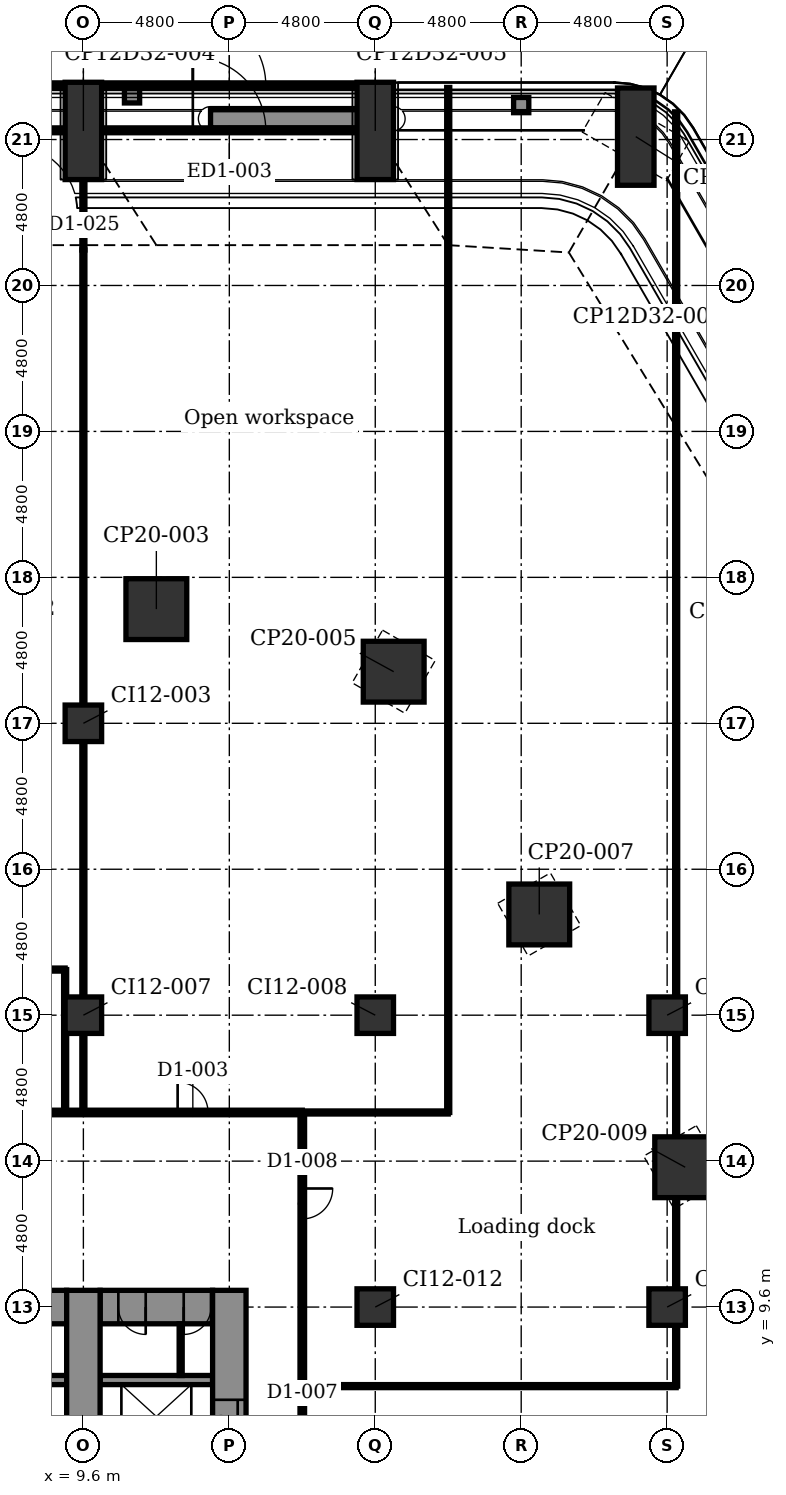
"""IFC4 building model, lengths in metres.
Left out: names, types, materials, properties, quantities, classifications, styles, units other than length and angle.
Written with IfcOpenShell. Run it as: python <this file> out.ifc"""

import sys

from ifc_helpers import new_model, si_unit, direction, frame, frame_2d, origin, origin_2d, place, context, subcontext, project, spatial, rectangle, extrude, element, fill, save


model = new_model("IFC4")
c1 = context("Model", 3, precision=1e-05, world=origin(), true_north=direction((0.0, 1.0)))
c2 = subcontext(c1, "Body", "Model", "MODEL_VIEW")
j1 = project(units=[si_unit("LENGTHUNIT", "METRE"), si_unit("PLANEANGLEUNIT", "RADIAN")], contexts=[c1])
p1 = place(None, origin())
s1 = spatial("IfcSite", under=j1, at=p1, CompositionType="ELEMENT")
p2 = place(p1, origin())
s2 = spatial("IfcBuilding", under=s1, at=p2, CompositionType="ELEMENT")
p3 = place(p2, origin())
s3 = spatial("IfcBuildingStorey", under=s2, at=p3, CompositionType="ELEMENT", Elevation=0.0)
for number, where, z_axis, x_axis in (
    (1, (9.6, 48.283, -0.4), (0.0, 0.0, 1.0), (1.0, 0.0, 0.0)),
    (2, (19.2, 48.283, -0.4), (0.0, 0.0, 1.0), (1.0, 0.0, 0.0)),
    (3, (27.768, 48.095, -0.4), (0.0, 0.0, 1.0), (0.5, 0.866, 0.0)),
):
    element("IfcColumn", number, at=place(p3, frame(where, z_axis=z_axis, x_axis=x_axis)), inside=s3, PredefinedType="COLUMN", context=c2, shape_type="SweptSolid", body=[
        extrude(rectangle(XDim=1.2, YDim=3.2, at=origin_2d()), origin(), (0.0, 0.0, 1.0), 7.1),
    ])
for number, where, z_axis, x_axis in (
    (4, (12.0, 32.555, -0.4), (0.0, 0.0, 1.0), (1.0, 0.0, 0.0)),
    (5, (19.806, 30.498, -0.4), (0.0, 0.0, 1.0), (0.5, 0.866, 0.0)),
    (6, (24.594, 22.513, -0.4), (0.0, 0.0, 1.0), (0.866, 0.5, 0.0)),
    (7, (29.394, 14.199, -0.4), (0.0, 0.0, 1.0), (0.866, 0.5, 0.0)),
):
    element("IfcColumn", number, at=place(p3, frame(where, z_axis=z_axis, x_axis=x_axis)), inside=s3, PredefinedType="COLUMN", context=c2, shape_type="SweptSolid", body=[
        extrude(rectangle(XDim=2.0, YDim=2.0, at=origin_2d()), origin(), (0.0, 0.0, 1.0), 7.1),
    ])
for number, where, z_axis, x_axis in (
    (8, (9.6, 19.2, -0.4), (0.0, 0.0, 1.0), (1.0, 0.0, 0.0)),
    (9, (9.6, 28.8, -0.4), (0.0, 0.0, 1.0), (1.0, 0.0, 0.0)),
    (10, (19.2, 9.6, -0.4), (0.0, 0.0, 1.0), (1.0, 0.0, 0.0)),
    (11, (19.2, 19.2, -0.4), (0.0, 0.0, 1.0), (1.0, 0.0, 0.0)),
    (12, (28.8, 9.6, -0.4), (0.0, 0.0, 1.0), (1.0, 0.0, 0.0)),
    (13, (28.8, 19.2, -0.4), (0.0, 0.0, 1.0), (1.0, 0.0, 0.0)),
):
    element("IfcColumn", number, at=place(p3, frame(where, z_axis=z_axis, x_axis=x_axis)), inside=s3, PredefinedType="COLUMN", context=c2, shape_type="SweptSolid", body=[
        extrude(rectangle(XDim=1.2, YDim=1.2, at=origin_2d()), origin(), (0.0, 0.0, 1.0), 7.1),
    ])
p4 = place(p3, frame((6.0, 7.2, -0.4), z_axis=(0.0, 0.0, 1.0), x_axis=(1.0, 0.0, 0.0)))
e14 = element("IfcWall", 14, at=p4, inside=s3, PredefinedType="STANDARD", context=c2, shape_type="SweptSolid", body=[
    extrude(rectangle(XDim=3.05, YDim=0.3, at=frame_2d((1.525, 0.0))), origin(), (0.0, 0.0, 1.0), 7.1),
])
p5 = place(p3, frame((10.15, 7.2, -0.4), z_axis=(0.0, 0.0, 1.0), x_axis=(1.0, 0.0, 0.0)))
e15 = element("IfcWall", 15, at=p5, inside=s3, PredefinedType="STANDARD", context=c2, shape_type="SweptSolid", body=[
    extrude(rectangle(XDim=3.7, YDim=0.3, at=frame_2d((1.85, 0.0))), origin(), (0.0, 0.0, 1.0), 7.1),
])
p6 = place(p3, frame((-5.25, 9.6, -0.4), z_axis=(0.0, 0.0, 1.0), x_axis=(1.0, 0.0, 0.0)))
e16 = element("IfcWall", 16, at=p6, inside=s3, PredefinedType="SHEAR", context=c2, shape_type="SweptSolid", body=[
    extrude(rectangle(XDim=14.3, YDim=1.1, at=frame_2d((7.15, 0.0))), origin(), (0.0, 0.0, 1.0), 7.1),
])
p7 = place(p6, frame((9.35, 0.0, 0.4)))
e17 = element("IfcOpeningElement", 17, at=p7, cuts=e16, PredefinedType="OPENING", context=c2, shape_type="SweptSolid", body=[
    extrude(rectangle(XDim=1.4, YDim=2.1, at=frame_2d((0.7, 1.05))), frame((0.0, 0.56, 0.0), z_axis=(0.0, -1.0, 0.0), x_axis=(1.0, 0.0, 0.0)), (0.0, 0.0, 1.0), 1.12),
])
p8 = place(p3, frame((10.15, 9.6, -0.4), z_axis=(0.0, 0.0, 1.0), x_axis=(1.0, 0.0, 0.0)))
e18 = element("IfcWall", 18, at=p8, inside=s3, PredefinedType="SHEAR", context=c2, shape_type="SweptSolid", body=[
    extrude(rectangle(XDim=3.7, YDim=1.1, at=frame_2d((1.85, 0.0))), origin(), (0.0, 0.0, 1.0), 7.1),
])
p9 = place(p8, frame((0.6, 0.0, 0.4)))
e19 = element("IfcOpeningElement", 19, at=p9, cuts=e18, PredefinedType="OPENING", context=c2, shape_type="SweptSolid", body=[
    extrude(rectangle(XDim=0.9, YDim=2.1, at=frame_2d((0.45, 1.05))), frame((0.0, 0.56, 0.0), z_axis=(0.0, -1.0, 0.0), x_axis=(1.0, 0.0, 0.0)), (0.0, 0.0, 1.0), 1.12),
])
p10 = place(p8, frame((2.75, 0.0, 0.4)))
e20 = element("IfcOpeningElement", 20, at=p10, cuts=e18, PredefinedType="OPENING", context=c2, shape_type="SweptSolid", body=[
    extrude(rectangle(XDim=0.9, YDim=2.1, at=frame_2d((0.45, 1.05))), frame((0.0, 0.56, 0.0), z_axis=(0.0, -1.0, 0.0), x_axis=(1.0, 0.0, 0.0)), (0.0, 0.0, 1.0), 1.12),
])
p11 = place(p3, frame((9.6, -10.15, -0.4), z_axis=(0.0, 0.0, 1.0), x_axis=(0.0, 1.0, 0.0)))
e21 = element("IfcWall", 21, at=p11, inside=s3, PredefinedType="SHEAR", context=c2, shape_type="SweptSolid", body=[
    extrude(rectangle(XDim=20.3, YDim=1.1, at=frame_2d((10.15, 0.0))), origin(), (0.0, 0.0, 1.0), 7.1),
])
p12 = place(p3, frame((14.4, -10.15, -0.4), z_axis=(0.0, 0.0, 1.0), x_axis=(0.0, 1.0, 0.0)))
e22 = element("IfcWall", 22, at=p12, inside=s3, PredefinedType="SHEAR", context=c2, shape_type="SweptSolid", body=[
    extrude(rectangle(XDim=20.3, YDim=1.1, at=frame_2d((10.15, 0.0))), origin(), (0.0, 0.0, 1.0), 7.1),
])
p13 = place(p12, frame((3.6, 0.0, 0.4)))
e23 = element("IfcOpeningElement", 23, at=p13, cuts=e22, PredefinedType="OPENING", context=c2, shape_type="SweptSolid", body=[
    extrude(rectangle(XDim=1.1, YDim=2.1, at=frame_2d((0.55, 1.05))), frame((0.0, 0.56, 0.0), z_axis=(0.0, -1.0, 0.0), x_axis=(1.0, 0.0, 0.0)), (0.0, 0.0, 1.0), 1.12),
])
p14 = place(p12, frame((6.0, 0.0, 0.4)))
e24 = element("IfcOpeningElement", 24, at=p14, cuts=e22, PredefinedType="OPENING", context=c2, shape_type="SweptSolid", body=[
    extrude(rectangle(XDim=1.1, YDim=2.1, at=frame_2d((0.55, 1.05))), frame((0.0, 0.56, 0.0), z_axis=(0.0, -1.0, 0.0), x_axis=(1.0, 0.0, 0.0)), (0.0, 0.0, 1.0), 1.12),
])
p15 = place(p12, frame((8.4, 0.0, 0.4)))
e25 = element("IfcOpeningElement", 25, at=p15, cuts=e22, PredefinedType="OPENING", context=c2, shape_type="SweptSolid", body=[
    extrude(rectangle(XDim=1.1, YDim=2.1, at=frame_2d((0.55, 1.05))), frame((0.0, 0.56, 0.0), z_axis=(0.0, -1.0, 0.0), x_axis=(1.0, 0.0, 0.0)), (0.0, 0.0, 1.0), 1.12),
])
p16 = place(p12, frame((10.8, 0.0, 0.4)))
e26 = element("IfcOpeningElement", 26, at=p16, cuts=e22, PredefinedType="OPENING", context=c2, shape_type="SweptSolid", body=[
    extrude(rectangle(XDim=1.1, YDim=2.1, at=frame_2d((0.55, 1.05))), frame((0.0, 0.56, 0.0), z_axis=(0.0, -1.0, 0.0), x_axis=(1.0, 0.0, 0.0)), (0.0, 0.0, 1.0), 1.12),
])
p17 = place(p12, frame((13.2, 0.0, 0.4)))
e27 = element("IfcOpeningElement", 27, at=p17, cuts=e22, PredefinedType="OPENING", context=c2, shape_type="SweptSolid", body=[
    extrude(rectangle(XDim=1.1, YDim=2.1, at=frame_2d((0.55, 1.05))), frame((0.0, 0.56, 0.0), z_axis=(0.0, -1.0, 0.0), x_axis=(1.0, 0.0, 0.0)), (0.0, 0.0, 1.0), 1.12),
])
p18 = place(p12, frame((15.6, 0.0, 0.4)))
e28 = element("IfcOpeningElement", 28, at=p18, cuts=e22, PredefinedType="OPENING", context=c2, shape_type="SweptSolid", body=[
    extrude(rectangle(XDim=1.1, YDim=2.1, at=frame_2d((0.55, 1.05))), frame((0.0, 0.56, 0.0), z_axis=(0.0, -1.0, 0.0), x_axis=(1.0, 0.0, 0.0)), (0.0, 0.0, 1.0), 1.12),
])
p19 = place(p3, frame((0.602, 48.303, 0.0), z_axis=(0.0, 0.0, 1.0), x_axis=(1.0, 0.0, 0.0)))
e29 = element("IfcWall", 29, at=p19, inside=s3, PredefinedType="PARTITIONING", context=c2, shape_type="SweptSolid", body=[
    extrude(rectangle(XDim=8.396, YDim=0.16, at=frame_2d((4.198, 0.0))), origin(), (0.0, 0.0, 1.0), 6.7),
])
p20 = place(p19, frame((2.998, 0.0, 0.0)))
e30 = element("IfcOpeningElement", 30, at=p20, cuts=e29, PredefinedType="OPENING", context=c2, shape_type="SweptSolid", body=[
    extrude(rectangle(XDim=2.4, YDim=2.4, at=frame_2d((1.2, 1.2))), frame((0.0, 0.09, 0.0), z_axis=(0.0, -1.0, 0.0), x_axis=(1.0, 0.0, 0.0)), (0.0, 0.0, 1.0), 0.18),
])
p21 = place(p3, frame((10.202, 48.303, 0.0), z_axis=(0.0, 0.0, 1.0), x_axis=(1.0, 0.0, 0.0)))
e31 = element("IfcWall", 31, at=p21, inside=s3, PredefinedType="PARTITIONING", context=c2, shape_type="SweptSolid", body=[
    extrude(rectangle(XDim=8.396, YDim=0.16, at=frame_2d((4.198, 0.0))), origin(), (0.0, 0.0, 1.0), 6.7),
])
p22 = place(p21, frame((2.998, 0.0, 0.0)))
e32 = element("IfcOpeningElement", 32, at=p22, cuts=e31, PredefinedType="OPENING", context=c2, shape_type="SweptSolid", body=[
    extrude(rectangle(XDim=2.4, YDim=2.4, at=frame_2d((1.2, 1.2))), frame((0.0, 0.09, 0.0), z_axis=(0.0, -1.0, 0.0), x_axis=(1.0, 0.0, 0.0)), (0.0, 0.0, 1.0), 0.18),
])
p23 = place(p3, frame((0.604, 49.783, 0.0), z_axis=(0.0, 0.0, 1.0), x_axis=(1.0, 0.0, 0.0)))
e33 = element("IfcWall", 33, at=p23, inside=s3, PredefinedType="PARTITIONING", context=c2, shape_type="SweptSolid", body=[
    extrude(rectangle(XDim=8.392, YDim=0.16, at=frame_2d((4.196, 0.0))), origin(), (0.0, 0.0, 1.0), 6.7),
])
p24 = place(p23, frame((2.996, 0.0, 0.0)))
e34 = element("IfcOpeningElement", 34, at=p24, cuts=e33, PredefinedType="OPENING", context=c2, shape_type="SweptSolid", body=[
    extrude(rectangle(XDim=2.4, YDim=2.4, at=frame_2d((1.2, 1.2))), frame((0.0, 0.09, 0.0), z_axis=(0.0, -1.0, 0.0), x_axis=(1.0, 0.0, 0.0)), (0.0, 0.0, 1.0), 0.18),
])
p25 = place(p3, frame((10.204, 49.783, 0.0), z_axis=(0.0, 0.0, 1.0), x_axis=(1.0, 0.0, 0.0)))
e35 = element("IfcWall", 35, at=p25, inside=s3, PredefinedType="PARTITIONING", context=c2, shape_type="SweptSolid", body=[
    extrude(rectangle(XDim=8.392, YDim=0.16, at=frame_2d((4.196, 0.0))), origin(), (0.0, 0.0, 1.0), 6.7),
])
p26 = place(p25, frame((2.996, 0.0, 0.0)))
e36 = element("IfcOpeningElement", 36, at=p26, cuts=e35, PredefinedType="OPENING", context=c2, shape_type="SweptSolid", body=[
    extrude(rectangle(XDim=2.4, YDim=2.4, at=frame_2d((1.2, 1.2))), frame((0.0, 0.09, 0.0), z_axis=(0.0, -1.0, 0.0), x_axis=(1.0, 0.0, 0.0)), (0.0, 0.0, 1.0), 0.18),
])
p27 = place(p3, frame((13.782, 48.683, 7.0), z_axis=(0.0, 0.0, 1.0), x_axis=(1.0, 0.0, 0.0)))
e37 = element("IfcWall", 37, at=p27, inside=s3, PredefinedType="USERDEFINED", context=c2, shape_type="SweptSolid", body=[
    extrude(rectangle(XDim=6.0, YDim=0.6, at=frame_2d((3.0, 0.0))), origin(), (0.0, 0.0, 1.0), 0.7),
])
for number, where, z_axis, x_axis in (
    (38, (10.95, 49.453, 0.0), (0.0, 0.0, 1.0), (1.0, 0.0, 0.0)),
    (39, (23.75, 49.133, 0.0), (0.0, 0.0, 1.0), (1.0, 0.0, 0.0)),
):
    element("IfcWall", number, at=place(p3, frame(where, z_axis=z_axis, x_axis=x_axis)), inside=s3, PredefinedType="SOLIDWALL", context=c2, shape_type="SweptSolid", body=[
        extrude(rectangle(XDim=0.5, YDim=0.5, at=frame_2d((0.25, 0.0))), origin(), (0.0, 0.0, 1.0), 6.4),
    ])
p28 = place(p3, frame((29.097, 7.0, 0.0), z_axis=(0.0, 0.0, 1.0), x_axis=(0.0, 1.0, 0.0)))
e40 = element("IfcWall", 40, at=p28, inside=s3, PredefinedType="PARTITIONING", context=c2, shape_type="SweptSolid", body=[
    extrude(rectangle(XDim=41.911, YDim=0.1, at=frame_2d((20.956, 0.0))), origin(), (0.0, 0.0, 1.0), 6.7),
])
p29 = place(p3, frame((21.6, 16.0, 0.0), z_axis=(0.0, 0.0, 1.0), x_axis=(0.0, 1.0, 0.0)))
e41 = element("IfcWall", 41, at=p29, inside=s3, PredefinedType="PARTITIONING", context=c2, shape_type="SweptSolid", body=[
    extrude(rectangle(XDim=33.713, YDim=0.1, at=frame_2d((16.856, 0.0))), origin(), (0.0, 0.0, 1.0), 6.7),
])
p30 = place(p3, frame((16.8, 3.95, 0.0), z_axis=(0.0, 0.0, 1.0), x_axis=(0.0, 1.0, 0.0)))
e42 = element("IfcWall", 42, at=p30, inside=s3, PredefinedType="PARTITIONING", context=c2, shape_type="SweptSolid", body=[
    extrude(rectangle(XDim=12.05, YDim=0.15, at=frame_2d((6.025, 0.0))), origin(), (0.0, 0.0, 1.0), 6.7),
])
p31 = place(p30, frame((0.95, 0.0, 0.0)))
e43 = element("IfcOpeningElement", 43, at=p31, cuts=e42, PredefinedType="OPENING", context=c2, shape_type="SweptSolid", body=[
    extrude(rectangle(XDim=1.0, YDim=2.1, at=frame_2d((0.5, 1.05))), frame((0.0, 0.085, 0.0), z_axis=(0.0, -1.0, 0.0), x_axis=(1.0, 0.0, 0.0)), (0.0, 0.0, 1.0), 0.17),
])
p32 = place(p30, frame((8.55, 0.0, 0.0)))
e44 = element("IfcOpeningElement", 44, at=p32, cuts=e42, PredefinedType="OPENING", context=c2, shape_type="SweptSolid", body=[
    extrude(rectangle(XDim=1.0, YDim=2.1, at=frame_2d((0.5, 1.05))), frame((0.0, 0.085, 0.0), z_axis=(0.0, -1.0, 0.0), x_axis=(1.0, 0.0, 0.0)), (0.0, 0.0, 1.0), 0.17),
])
p33 = place(p3, frame((12.8, 7.35, 0.0), z_axis=(0.0, 0.0, 1.0), x_axis=(0.0, 1.0, 0.0)))
e45 = element("IfcWall", 45, at=p33, inside=s3, PredefinedType="PARTITIONING", context=c2, shape_type="SweptSolid", body=[
    extrude(rectangle(XDim=1.7, YDim=0.1, at=frame_2d((0.85, 0.0))), origin(), (0.0, 0.0, 1.0), 6.7),
])
p34 = place(p3, frame((9.6, 29.36, 0.0), z_axis=(0.0, 0.0, 1.0), x_axis=(0.0, 1.0, 0.0)))
e46 = element("IfcWall", 46, at=p34, inside=s3, PredefinedType="PARTITIONING", context=c2, shape_type="SweptSolid", body=[
    extrude(rectangle(XDim=15.006, YDim=0.1, at=frame_2d((7.503, 0.0))), origin(), (0.0, 0.0, 1.0), 6.016),
])
p35 = place(p3, frame((9.6, 16.0, 0.0), z_axis=(0.0, 0.0, 1.0), x_axis=(0.0, 1.0, 0.0)))
e47 = element("IfcWall", 47, at=p35, inside=s3, PredefinedType="PARTITIONING", context=c2, shape_type="SweptSolid", body=[
    extrude(rectangle(XDim=2.64, YDim=0.1, at=frame_2d((1.32, 0.0))), origin(), (0.0, 0.0, 1.0), 6.293),
])
p36 = place(p3, frame((9.6, 18.64, 0.0), z_axis=(0.0, 0.0, 1.0), x_axis=(0.0, 1.0, 0.0)))
e48 = element("IfcWall", 48, at=p36, inside=s3, PredefinedType="PARTITIONING", context=c2, shape_type="SweptSolid", body=[
    extrude(rectangle(XDim=1.12, YDim=0.1, at=frame_2d((0.56, 0.0))), origin(), (0.0, 0.0, 1.0), 6.7),
])
p37 = place(p3, frame((9.6, 19.76, 0.0), z_axis=(0.0, 0.0, 1.0), x_axis=(0.0, 1.0, 0.0)))
e49 = element("IfcWall", 49, at=p37, inside=s3, PredefinedType="PARTITIONING", context=c2, shape_type="SweptSolid", body=[
    extrude(rectangle(XDim=8.48, YDim=0.1, at=frame_2d((4.24, 0.0))), origin(), (0.0, 0.0, 1.0), 6.293),
])
p38 = place(p3, frame((9.6, 28.24, 0.0), z_axis=(0.0, 0.0, 1.0), x_axis=(0.0, 1.0, 0.0)))
e50 = element("IfcWall", 50, at=p38, inside=s3, PredefinedType="PARTITIONING", context=c2, shape_type="SweptSolid", body=[
    extrude(rectangle(XDim=1.12, YDim=0.1, at=frame_2d((0.56, 0.0))), origin(), (0.0, 0.0, 1.0), 6.7),
])
p39 = place(p3, frame((9.6, 44.366, 0.0), z_axis=(0.0, 0.0, 1.0), x_axis=(0.0, 1.0, 0.0)))
e51 = element("IfcWall", 51, at=p39, inside=s3, PredefinedType="PARTITIONING", context=c2, shape_type="SweptSolid", body=[
    extrude(rectangle(XDim=5.347, YDim=0.1, at=frame_2d((2.673, 0.0))), origin(), (0.0, 0.0, 1.0), 6.7),
])
p40 = place(p3, frame((9.0, 16.0, 0.0), z_axis=(0.0, 0.0, 1.0), x_axis=(0.0, 1.0, 0.0)))
e52 = element("IfcWall", 52, at=p40, inside=s3, PredefinedType="PARTITIONING", context=c2, shape_type="SweptSolid", body=[
    extrude(rectangle(XDim=4.7, YDim=0.1, at=frame_2d((2.35, 0.0))), origin(), (0.0, 0.0, 1.0), 6.7),
])
p41 = place(p3, frame((16.8, 7.0, 0.0), z_axis=(0.0, 0.0, 1.0), x_axis=(1.0, 0.0, 0.0)))
e53 = element("IfcWall", 53, at=p41, inside=s3, PredefinedType="PARTITIONING", context=c2, shape_type="SweptSolid", body=[
    extrude(rectangle(XDim=12.297, YDim=0.1, at=frame_2d((6.148, 0.0))), origin(), (0.0, 0.0, 1.0), 6.7),
])
p42 = place(p3, frame((16.8, 16.0, 0.0), z_axis=(0.0, 0.0, 1.0), x_axis=(1.0, 0.0, 0.0)))
e54 = element("IfcWall", 54, at=p42, inside=s3, PredefinedType="PARTITIONING", context=c2, shape_type="SweptSolid", body=[
    extrude(rectangle(XDim=4.8, YDim=0.1, at=frame_2d((2.4, 0.0))), origin(), (0.0, 0.0, 1.0), 6.7),
])
p43 = place(p3, frame((-16.8, 16.0, 0.0), z_axis=(0.0, 0.0, 1.0), x_axis=(1.0, 0.0, 0.0)))
e55 = element("IfcWall", 55, at=p43, inside=s3, PredefinedType="PARTITIONING", context=c2, shape_type="SweptSolid", body=[
    extrude(rectangle(XDim=33.6, YDim=0.15, at=frame_2d((16.8, 0.0))), origin(), (0.0, 0.0, 1.0), 6.7),
])
p44 = place(p43, frame((3.1, 0.0, 0.0)))
e56 = element("IfcOpeningElement", 56, at=p44, cuts=e55, PredefinedType="OPENING", context=c2, shape_type="SweptSolid", body=[
    extrude(rectangle(XDim=1.0, YDim=2.1, at=frame_2d((0.5, 1.05))), frame((0.0, 0.085, 0.0), z_axis=(0.0, -1.0, 0.0), x_axis=(1.0, 0.0, 0.0)), (0.0, 0.0, 1.0), 0.17),
])
p45 = place(p43, frame((12.1, 0.0, 0.0)))
e57 = element("IfcOpeningElement", 57, at=p45, cuts=e55, PredefinedType="OPENING", context=c2, shape_type="SweptSolid", body=[
    extrude(rectangle(XDim=1.0, YDim=2.1, at=frame_2d((0.5, 1.05))), frame((0.0, 0.085, 0.0), z_axis=(0.0, -1.0, 0.0), x_axis=(1.0, 0.0, 0.0)), (0.0, 0.0, 1.0), 0.17),
])
p46 = place(p43, frame((29.5, 0.0, 0.0)))
e58 = element("IfcOpeningElement", 58, at=p46, cuts=e55, PredefinedType="OPENING", context=c2, shape_type="SweptSolid", body=[
    extrude(rectangle(XDim=1.0, YDim=2.1, at=frame_2d((0.5, 1.05))), frame((0.0, 0.085, 0.0), z_axis=(0.0, -1.0, 0.0), x_axis=(1.0, 0.0, 0.0)), (0.0, 0.0, 1.0), 0.17),
])
p47 = place(p43, frame((23.735, 0.0, 0.0)))
e59 = element("IfcOpeningElement", 59, at=p47, cuts=e55, PredefinedType="OPENING", context=c2, shape_type="SweptSolid", body=[
    extrude(rectangle(XDim=1.0, YDim=2.1, at=frame_2d((0.5, 1.05))), frame((0.0, 0.085, 0.0), z_axis=(0.0, -1.0, 0.0), x_axis=(1.0, 0.0, 0.0)), (0.0, 0.0, 1.0), 0.17),
])
p48 = place(p43, frame((18.4, 0.0, 0.0)))
e60 = element("IfcOpeningElement", 60, at=p48, cuts=e55, PredefinedType="OPENING", context=c2, shape_type="SweptSolid", body=[
    extrude(rectangle(XDim=1.0, YDim=2.1, at=frame_2d((0.5, 1.05))), frame((0.0, 0.085, 0.0), z_axis=(0.0, -1.0, 0.0), x_axis=(1.0, 0.0, 0.0)), (0.0, 0.0, 1.0), 0.17),
])
p49 = place(p3, frame((3.0, 20.7, 0.0), z_axis=(0.0, 0.0, 1.0), x_axis=(1.0, 0.0, 0.0)))
e61 = element("IfcWall", 61, at=p49, inside=s3, PredefinedType="PARTITIONING", context=c2, shape_type="SweptSolid", body=[
    extrude(rectangle(XDim=6.0, YDim=0.1, at=frame_2d((3.0, 0.0))), origin(), (0.0, 0.0, 1.0), 6.7),
])
p50 = place(p22, origin())
e62 = element("IfcDoor", 62, at=p50, inside=s3, OperationType="DOUBLE_DOOR_DOUBLE_SWING", PredefinedType="DOOR", context=c2, shape_type="SweptSolid", body=[
    extrude(rectangle(XDim=2.4, YDim=2.4, at=frame_2d((1.2, 1.2))), frame((0.0, 0.025, 0.0), z_axis=(0.0, -1.0, 0.0), x_axis=(1.0, 0.0, 0.0)), (0.0, 0.0, 1.0), 0.05),
])
fill(e32, e62)
p51 = place(p26, origin())
e63 = element("IfcDoor", 63, at=p51, inside=s3, OperationType="DOUBLE_DOOR_DOUBLE_SWING", PredefinedType="DOOR", context=c2, shape_type="SweptSolid", body=[
    extrude(rectangle(XDim=2.4, YDim=2.4, at=frame_2d((1.2, 1.2))), frame((0.0, 0.025, 0.0), z_axis=(0.0, -1.0, 0.0), x_axis=(1.0, 0.0, 0.0)), (0.0, 0.0, 1.0), 0.05),
])
fill(e36, e63)
p52 = place(p46, origin())
e64 = element("IfcDoor", 64, at=p52, inside=s3, OperationType="SINGLE_SWING_LEFT", PredefinedType="DOOR", context=c2, shape_type="SweptSolid", body=[
    extrude(rectangle(XDim=1.0, YDim=2.1, at=frame_2d((0.5, 1.05))), frame((0.0, 0.025, 0.0), z_axis=(0.0, -1.0, 0.0), x_axis=(1.0, 0.0, 0.0)), (0.0, 0.0, 1.0), 0.05),
])
fill(e58, e64)
p53 = place(p32, frame((1.0, 0.0, 0.0), z_axis=(0.0, 0.0, 1.0), x_axis=(-1.0, 0.0, 0.0)))
e65 = element("IfcDoor", 65, at=p53, inside=s3, OperationType="SINGLE_SWING_RIGHT", PredefinedType="DOOR", context=c2, shape_type="SweptSolid", body=[
    extrude(rectangle(XDim=1.0, YDim=2.1, at=frame_2d((0.5, 1.05))), frame((0.0, 0.025, 0.0), z_axis=(0.0, -1.0, 0.0), x_axis=(1.0, 0.0, 0.0)), (0.0, 0.0, 1.0), 0.05),
])
fill(e44, e65)
p54 = place(p18, origin())
e66 = element("IfcDoor", 66, at=p54, inside=s3, OperationType="DOUBLE_DOOR_SLIDING", PredefinedType="DOOR", context=c2, shape_type="SweptSolid", body=[
    extrude(rectangle(XDim=1.1, YDim=2.1, at=frame_2d((0.55, 1.05))), frame((0.0, 0.025, 0.0), z_axis=(0.0, -1.0, 0.0), x_axis=(1.0, 0.0, 0.0)), (0.0, 0.0, 1.0), 0.05),
])
fill(e28, e66)
p55 = place(p9, frame((0.9, 0.0, 0.0), z_axis=(0.0, 0.0, 1.0), x_axis=(-1.0, 0.0, 0.0)))
e67 = element("IfcDoor", 67, at=p55, inside=s3, OperationType="SINGLE_SWING_RIGHT", PredefinedType="DOOR", context=c2, shape_type="SweptSolid", body=[
    extrude(rectangle(XDim=0.9, YDim=2.1, at=frame_2d((0.45, 1.05))), frame((0.0, 0.025, 0.0), z_axis=(0.0, -1.0, 0.0), x_axis=(1.0, 0.0, 0.0)), (0.0, 0.0, 1.0), 0.05),
])
fill(e19, e67)
p56 = place(p10, frame((0.9, 0.0, 0.0), z_axis=(0.0, 0.0, 1.0), x_axis=(-1.0, 0.0, 0.0)))
e68 = element("IfcDoor", 68, at=p56, inside=s3, OperationType="SINGLE_SWING_LEFT", PredefinedType="DOOR", context=c2, shape_type="SweptSolid", body=[
    extrude(rectangle(XDim=0.9, YDim=2.1, at=frame_2d((0.45, 1.05))), frame((0.0, 0.025, 0.0), z_axis=(0.0, -1.0, 0.0), x_axis=(1.0, 0.0, 0.0)), (0.0, 0.0, 1.0), 0.05),
])
fill(e20, e68)
save(model, sys.argv[1])
